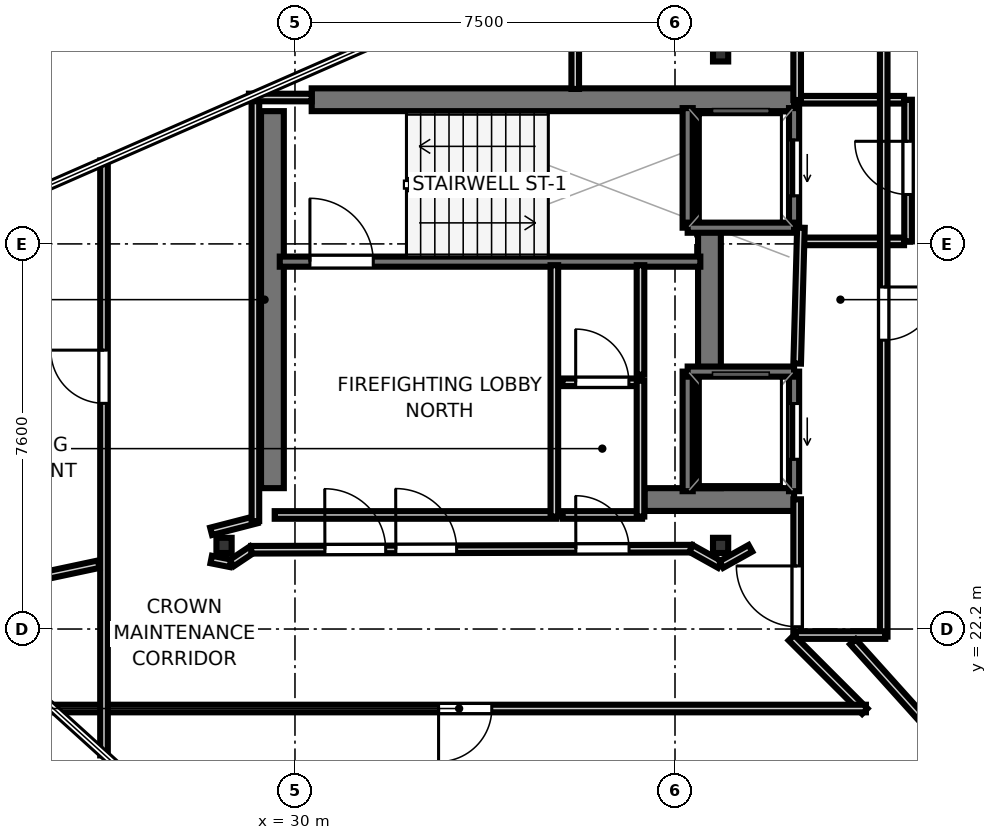
"""IFC4 building model, lengths in metres.
Left out: names, types, materials, properties, quantities, classifications, styles, units other than length and angle.
Written with IfcOpenShell. Run it as: python <this file> out.ifc"""

import sys

from ifc_helpers import new_model, si_unit, direction, frame, frame_2d, origin, origin_2d, place, context, subcontext, project, spatial, rectangle, i_section, extrude, element, fill, save


model = new_model("IFC4")
c1 = context("Model", 3, precision=1e-05, world=origin(), true_north=direction((0.0, 1.0)))
c2 = subcontext(c1, "Body", "Model", "MODEL_VIEW")
j1 = project(units=[si_unit("LENGTHUNIT", "METRE"), si_unit("PLANEANGLEUNIT", "RADIAN")], contexts=[c1])
p1 = place(None, origin())
s1 = spatial("IfcSite", under=j1, at=p1, CompositionType="ELEMENT")
p2 = place(p1, origin())
s2 = spatial("IfcBuilding", under=s1, at=p2, CompositionType="ELEMENT")
p3 = place(p2, frame((0.0, 0.0, 367.55)))
s3 = spatial("IfcBuildingStorey", under=s2, at=p3, CompositionType="ELEMENT", Elevation=367.55)
p4 = place(p3, frame((30.33, 32.645, 0.0), z_axis=(0.0, 0.0, 1.0), x_axis=(1.0, 0.0, 0.0)))
e1 = element("IfcWall", 1, at=p4, inside=s3, PredefinedType="SHEAR", context=c2, shape_type="SweptSolid", body=[
    extrude(rectangle(XDim=9.52, YDim=0.45, at=frame_2d((4.76, 0.0))), origin(), (0.0, 0.0, 1.0), 3.55),
])
p5 = place(p3, frame((36.9, 24.755, 0.0), z_axis=(0.0, 0.0, 1.0), x_axis=(1.0, 0.0, 0.0)))
e2 = element("IfcWall", 2, at=p5, inside=s3, PredefinedType="SHEAR", context=c2, shape_type="SweptSolid", body=[
    extrude(rectangle(XDim=2.95, YDim=0.45, at=frame_2d((1.475, 0.0))), origin(), (0.0, 0.0, 1.0), 3.55),
])
for number, where, z_axis, x_axis in (
    (3, (29.555, 24.98, 0.0), (0.0, 0.0, 1.0), (0.0, 1.0, 0.0)),
    (4, (38.18, 24.98, 0.0), (0.0, 0.0, 1.0), (0.0, 1.0, 0.0)),
):
    element("IfcWall", number, at=place(p3, frame(where, z_axis=z_axis, x_axis=x_axis)), inside=s3, PredefinedType="SHEAR", context=c2, shape_type="SweptSolid", body=[
        extrude(rectangle(XDim=7.44, YDim=0.45, at=frame_2d((3.72, 0.0))), origin(), (0.0, 0.0, 1.0), 3.55),
    ])
for number, where, z_axis, x_axis in (
    (5, (28.6, 23.85, 0.0), (0.0, 0.0, 1.0), (1.0, 0.0, 0.0)),
    (6, (38.4, 33.55, 0.0), (0.0, 0.0, 1.0), (1.0, 0.0, 0.0)),
    (7, (38.4, 23.85, 0.0), (0.0, 0.0, 1.0), (1.0, 0.0, 0.0)),
):
    element("IfcColumn", number, at=place(p3, frame(where, z_axis=z_axis, x_axis=x_axis)), inside=s3, PredefinedType="COLUMN", context=c2, shape_type="SweptSolid", body=[
        extrude(i_section(OverallWidth=0.3, OverallDepth=0.3, WebThickness=0.01, FlangeThickness=0.015, at=origin_2d()), origin(), (0.0, 0.0, 1.0), 3.75),
    ])
p6 = place(p3, frame((29.7, 29.45, 0.0), z_axis=(0.0, 0.0, 1.0), x_axis=(1.0, 0.0, 0.0)))
e8 = element("IfcWall", 8, at=p6, inside=s3, PredefinedType="SOLIDWALL", context=c2, shape_type="SweptSolid", body=[
    extrude(rectangle(XDim=8.3, YDim=0.2, at=frame_2d((4.15, 0.0))), origin(), (0.0, 0.0, 1.0), 3.55),
])
p7 = place(p6, frame((0.595, 0.0, 0.0)))
e9 = element("IfcOpeningElement", 9, at=p7, cuts=e8, PredefinedType="OPENING", context=c2, shape_type="SweptSolid", body=[
    extrude(rectangle(XDim=1.25, YDim=2.15, at=frame_2d((0.625, 1.075))), frame((0.0, 0.11, 0.0), z_axis=(0.0, -1.0, 0.0), x_axis=(1.0, 0.0, 0.0)), (0.0, 0.0, 1.0), 0.22),
])
p8 = place(p3, frame((39.85, 30.12, 0.0), z_axis=(0.0, 0.0, 1.0), x_axis=(0.0, 1.0, 0.0)))
e10 = element("IfcWall", 10, at=p8, inside=s3, PredefinedType="SOLIDWALL", context=c2, shape_type="SweptSolid", body=[
    extrude(rectangle(XDim=2.36, YDim=0.2, at=frame_2d((1.18, 0.0))), origin(), (0.0, 0.0, 1.0), 3.55),
])
p9 = place(p8, frame((0.63, 0.0, 0.0)))
e11 = element("IfcOpeningElement", 11, at=p9, cuts=e10, PredefinedType="OPENING", context=c2, shape_type="SweptSolid", body=[
    extrude(rectangle(XDim=1.1, YDim=2.15, at=frame_2d((0.55, 1.075))), frame((0.0, 0.11, 0.0), z_axis=(0.0, -1.0, 0.0), x_axis=(1.0, 0.0, 0.0)), (0.0, 0.0, 1.0), 0.22),
])
p10 = place(p3, frame((37.75, 30.12, 0.0), z_axis=(0.0, 0.0, 1.0), x_axis=(0.0, 1.0, 0.0)))
e12 = element("IfcWall", 12, at=p10, inside=s3, PredefinedType="SOLIDWALL", context=c2, shape_type="SweptSolid", body=[
    extrude(rectangle(XDim=2.36, YDim=0.2, at=frame_2d((1.18, 0.0))), origin(), (0.0, 0.0, 1.0), 3.55),
])
p11 = place(p3, frame((37.75, 30.12, 0.0), z_axis=(0.0, 0.0, 1.0), x_axis=(1.0, 0.0, 0.0)))
e13 = element("IfcWall", 13, at=p11, inside=s3, PredefinedType="SOLIDWALL", context=c2, shape_type="SweptSolid", body=[
    extrude(rectangle(XDim=2.1, YDim=0.2, at=frame_2d((1.05, 0.0))), origin(), (0.0, 0.0, 1.0), 3.55),
])
p12 = place(p3, frame((39.85, 24.92, 0.0), z_axis=(0.0, 0.0, 1.0), x_axis=(0.0, 1.0, 0.0)))
e14 = element("IfcWall", 14, at=p12, inside=s3, PredefinedType="SOLIDWALL", context=c2, shape_type="SweptSolid", body=[
    extrude(rectangle(XDim=2.36, YDim=0.2, at=frame_2d((1.18, 0.0))), origin(), (0.0, 0.0, 1.0), 3.55),
])
p13 = place(p12, frame((0.63, 0.0, 0.0)))
e15 = element("IfcOpeningElement", 15, at=p13, cuts=e14, PredefinedType="OPENING", context=c2, shape_type="SweptSolid", body=[
    extrude(rectangle(XDim=1.1, YDim=2.15, at=frame_2d((0.55, 1.075))), frame((0.0, 0.11, 0.0), z_axis=(0.0, -1.0, 0.0), x_axis=(1.0, 0.0, 0.0)), (0.0, 0.0, 1.0), 0.22),
])
p14 = place(p3, frame((37.75, 24.92, 0.0), z_axis=(0.0, 0.0, 1.0), x_axis=(0.0, 1.0, 0.0)))
e16 = element("IfcWall", 16, at=p14, inside=s3, PredefinedType="SOLIDWALL", context=c2, shape_type="SweptSolid", body=[
    extrude(rectangle(XDim=2.36, YDim=0.2, at=frame_2d((1.18, 0.0))), origin(), (0.0, 0.0, 1.0), 3.55),
])
p15 = place(p3, frame((37.75, 27.28, 0.0), z_axis=(0.0, 0.0, 1.0), x_axis=(1.0, 0.0, 0.0)))
e17 = element("IfcWall", 17, at=p15, inside=s3, PredefinedType="SOLIDWALL", context=c2, shape_type="SweptSolid", body=[
    extrude(rectangle(XDim=2.1, YDim=0.2, at=frame_2d((1.05, 0.0))), origin(), (0.0, 0.0, 1.0), 3.55),
])
p16 = place(p3, frame((42.1, 29.85, 0.0), z_axis=(0.0, 0.0, 1.0), x_axis=(0.0, 1.0, 0.0)))
e18 = element("IfcWall", 18, at=p16, inside=s3, PredefinedType="PARTITIONING", context=c2, shape_type="SweptSolid", body=[
    extrude(rectangle(XDim=2.795, YDim=0.15, at=frame_2d((1.397, 0.0))), origin(), (0.0, 0.0, 1.0), 2.87),
])
p17 = place(p16, frame((0.925, 0.0, 0.0)))
e19 = element("IfcOpeningElement", 19, at=p17, cuts=e18, PredefinedType="OPENING", context=c2, shape_type="SweptSolid", body=[
    extrude(rectangle(XDim=1.05, YDim=2.15, at=frame_2d((0.525, 1.075))), frame((0.0, 0.085, 0.0), z_axis=(0.0, -1.0, 0.0), x_axis=(1.0, 0.0, 0.0)), (0.0, 0.0, 1.0), 0.17),
])
for number, where, z_axis, x_axis in (
    (20, (39.96, 29.85, 0.0), (0.0, 0.0, 1.0), (1.0, 0.0, 0.0)),
    (21, (39.96, 32.645, 0.0), (0.0, 0.0, 1.0), (1.0, 0.0, 0.0)),
):
    element("IfcWall", number, at=place(p3, frame(where, z_axis=z_axis, x_axis=x_axis)), inside=s3, PredefinedType="PARTITIONING", context=c2, shape_type="SweptSolid", body=[
        extrude(rectangle(XDim=2.06, YDim=0.15, at=frame_2d((1.03, 0.0))), origin(), (0.0, 0.0, 1.0), 2.87),
    ])
p18 = place(p3, frame((35.15, 24.451, 0.0), z_axis=(0.0, 0.0, 1.0), x_axis=(-1.0, 0.0, 0.0)))
e22 = element("IfcWall", 22, at=p18, inside=s3, PredefinedType="PARTITIONING", context=c2, shape_type="SweptSolid", body=[
    extrude(rectangle(XDim=5.55, YDim=0.15, at=frame_2d((2.775, 0.0))), origin(), (0.0, 0.0, 1.0), 2.87),
])
p19 = place(p3, frame((35.119, 29.38, 0.0), z_axis=(0.0, 0.0, 1.0), x_axis=(0.0, -1.0, 0.0)))
e23 = element("IfcWall", 23, at=p19, inside=s3, PredefinedType="PARTITIONING", context=c2, shape_type="SweptSolid", body=[
    extrude(rectangle(XDim=4.96, YDim=0.15, at=frame_2d((2.48, 0.0))), origin(), (0.0, 0.0, 1.0), 2.08),
])
p20 = place(p3, frame((39.911, 22.05, 0.0), z_axis=(0.0, 0.0, 1.0), x_axis=(0.0, 1.0, 0.0)))
e24 = element("IfcWall", 24, at=p20, inside=s3, PredefinedType="PARTITIONING", context=c2, shape_type="SweptSolid", body=[
    extrude(rectangle(XDim=2.71, YDim=0.15, at=frame_2d((1.355, 0.0))), origin(), (0.0, 0.0, 1.0), 2.87),
])
p21 = place(p20, frame((0.195, 0.0, 0.0)))
e25 = element("IfcOpeningElement", 25, at=p21, cuts=e24, PredefinedType="OPENING", context=c2, shape_type="SweptSolid", body=[
    extrude(rectangle(XDim=1.2, YDim=2.15, at=frame_2d((0.6, 1.075))), frame((0.0, 0.085, 0.0), z_axis=(0.0, -1.0, 0.0), x_axis=(1.0, 0.0, 0.0)), (0.0, 0.0, 1.0), 0.17),
])
p22 = place(p3, frame((39.911, 27.439, 0.0), z_axis=(0.0, 0.0, 1.0), x_axis=(0.027673579092, 0.999617013171, 0.0)))
e26 = element("IfcWall", 26, at=p22, inside=s3, PredefinedType="PARTITIONING", context=c2, shape_type="SweptSolid", body=[
    extrude(rectangle(XDim=2.682, YDim=0.15, at=frame_2d((1.341, 0.0))), origin(), (0.0, 0.0, 1.0), 2.87),
])
p23 = place(p3, frame((39.911, 32.64, 0.0), z_axis=(0.0, 0.0, 1.0), x_axis=(0.0, 1.0, 0.0)))
e27 = element("IfcWall", 27, at=p23, inside=s3, PredefinedType="PARTITIONING", context=c2, shape_type="SweptSolid", body=[
    extrude(rectangle(XDim=2.16, YDim=0.15, at=frame_2d((1.08, 0.0))), origin(), (0.0, 0.0, 1.0), 2.87),
])
p24 = place(p3, frame((41.619, 34.8, 0.0), z_axis=(0.0, 0.0, 1.0), x_axis=(0.0, -1.0, 0.0)))
e28 = element("IfcWall", 28, at=p24, inside=s3, PredefinedType="PARTITIONING", context=c2, shape_type="SweptSolid", body=[
    extrude(rectangle(XDim=12.75, YDim=0.15, at=frame_2d((6.375, 0.0))), origin(), (0.0, 0.0, 1.0), 2.87),
])
p25 = place(p24, frame((5.85, 0.0, 0.0)))
e29 = element("IfcOpeningElement", 29, at=p25, cuts=e28, PredefinedType="OPENING", context=c2, shape_type="SweptSolid", body=[
    extrude(rectangle(XDim=1.05, YDim=2.15, at=frame_2d((0.525, 1.075))), frame((0.0, 0.085, 0.0), z_axis=(0.0, -1.0, 0.0), x_axis=(1.0, 0.0, 0.0)), (0.0, 0.0, 1.0), 0.17),
])
p26 = place(p3, frame((41.65, 22.081, 0.0), z_axis=(0.0, 0.0, 1.0), x_axis=(-1.0, 0.0, 0.0)))
e30 = element("IfcWall", 30, at=p26, inside=s3, PredefinedType="PARTITIONING", context=c2, shape_type="SweptSolid", body=[
    extrude(rectangle(XDim=1.77, YDim=0.15, at=frame_2d((0.885, 0.0))), origin(), (0.0, 0.0, 1.0), 2.87),
])
p27 = place(p3, frame((36.85, 24.451, 0.0), z_axis=(0.0, 0.0, 1.0), x_axis=(-1.0, 0.0, 0.0)))
e31 = element("IfcWall", 31, at=p27, inside=s3, PredefinedType="PARTITIONING", context=c2, shape_type="SweptSolid", body=[
    extrude(rectangle(XDim=1.57, YDim=0.15, at=frame_2d((0.785, 0.0))), origin(), (0.0, 0.0, 1.0), 2.87),
])
p28 = place(p3, frame((35.28, 27.069, 0.0), z_axis=(0.0, 0.0, 1.0), x_axis=(1.0, 0.0, 0.0)))
e32 = element("IfcWall", 32, at=p28, inside=s3, PredefinedType="PARTITIONING", context=c2, shape_type="SweptSolid", body=[
    extrude(rectangle(XDim=1.57, YDim=0.15, at=frame_2d((0.785, 0.0))), origin(), (0.0, 0.0, 1.0), 2.87),
])
p29 = place(p28, frame((0.26, 0.0, 0.0)))
e33 = element("IfcOpeningElement", 33, at=p29, cuts=e32, PredefinedType="OPENING", context=c2, shape_type="SweptSolid", body=[
    extrude(rectangle(XDim=1.05, YDim=2.15, at=frame_2d((0.525, 1.075))), frame((0.0, 0.085, 0.0), z_axis=(0.0, -1.0, 0.0), x_axis=(1.0, 0.0, 0.0)), (0.0, 0.0, 1.0), 0.17),
])
p30 = place(p3, frame((36.819, 27.1, 0.0), z_axis=(0.0, 0.0, 1.0), x_axis=(0.0, -1.0, 0.0)))
e34 = element("IfcWall", 34, at=p30, inside=s3, PredefinedType="PARTITIONING", context=c2, shape_type="SweptSolid", body=[
    extrude(rectangle(XDim=2.68, YDim=0.15, at=frame_2d((1.34, 0.0))), origin(), (0.0, 0.0, 1.0), 2.87),
])
p31 = place(p3, frame((36.819, 29.38, 0.0), z_axis=(0.0, 0.0, 1.0), x_axis=(0.0, -1.0, 0.0)))
e35 = element("IfcWall", 35, at=p31, inside=s3, PredefinedType="PARTITIONING", context=c2, shape_type="SweptSolid", body=[
    extrude(rectangle(XDim=2.16, YDim=0.15, at=frame_2d((1.08, 0.0))), origin(), (0.0, 0.0, 1.0), 2.87),
])
p32 = place(p3, frame((35.531, 32.858, 0.0), z_axis=(0.0, 0.0, 1.0), x_axis=(0.0, 1.0, 0.0)))
e36 = element("IfcWall", 36, at=p32, inside=s3, PredefinedType="PARTITIONING", context=c2, shape_type="SweptSolid", body=[
    extrude(rectangle(XDim=2.666, YDim=0.15, at=frame_2d((1.333, 0.0))), origin(), (0.0, 0.0, 1.0), 2.87),
])
p33 = place(p3, frame((29.242, 24.359, 0.0), z_axis=(0.0, 0.0, 1.0), x_axis=(-0.968190928123, -0.250212563035, 0.0)))
e37 = element("IfcWall", 37, at=p33, inside=s3, PredefinedType="PARTITIONING", context=c2, shape_type="SweptSolid", body=[
    extrude(rectangle(XDim=0.927, YDim=0.15, at=frame_2d((0.463, 0.0))), origin(), (0.0, 0.0, 1.0), 2.87),
])
p34 = place(p3, frame((28.346, 23.572, 0.0), z_axis=(0.0, 0.0, 1.0), x_axis=(0.980749356168, -0.19527083852, 0.0)))
e38 = element("IfcWall", 38, at=p34, inside=s3, PredefinedType="PARTITIONING", context=c2, shape_type="SweptSolid", body=[
    extrude(rectangle(XDim=0.389, YDim=0.15, at=frame_2d((0.194, 0.0))), origin(), (0.0, 0.0, 1.0), 2.87),
])
p35 = place(p3, frame((28.751, 23.501, 0.0), z_axis=(0.0, 0.0, 1.0), x_axis=(0.831506528289, 0.555514980368, 0.0)))
e39 = element("IfcWall", 39, at=p35, inside=s3, PredefinedType="PARTITIONING", context=c2, shape_type="SweptSolid", body=[
    extrude(rectangle(XDim=0.484, YDim=0.15, at=frame_2d((0.242, 0.0))), origin(), (0.0, 0.0, 1.0), 2.87),
])
p36 = place(p3, frame((29.136, 23.764, 0.0), z_axis=(0.0, 0.0, 1.0), x_axis=(0.999996877471, 0.002499009437, 0.0)))
e40 = element("IfcWall", 40, at=p36, inside=s3, PredefinedType="PARTITIONING", context=c2, shape_type="SweptSolid", body=[
    extrude(rectangle(XDim=8.695, YDim=0.15, at=frame_2d((4.347, 0.0))), origin(), (0.0, 0.0, 1.0), 2.87),
])
p37 = place(p36, frame((2.854, 0.0, 0.0)))
e41 = element("IfcOpeningElement", 41, at=p37, cuts=e40, PredefinedType="OPENING", context=c2, shape_type="SweptSolid", body=[
    extrude(rectangle(XDim=1.2, YDim=2.15, at=frame_2d((0.6, 1.075))), frame((0.0, 0.085, 0.0), z_axis=(0.0, -1.0, 0.0), x_axis=(1.0, 0.0, 0.0)), (0.0, 0.0, 1.0), 0.17),
])
p38 = place(p36, frame((6.407, 0.0, 0.0)))
e42 = element("IfcOpeningElement", 42, at=p38, cuts=e40, PredefinedType="OPENING", context=c2, shape_type="SweptSolid", body=[
    extrude(rectangle(XDim=1.05, YDim=2.15, at=frame_2d((0.525, 1.075))), frame((0.0, 0.085, 0.0), z_axis=(0.0, -1.0, 0.0), x_axis=(1.0, 0.0, 0.0)), (0.0, 0.0, 1.0), 0.17),
])
p39 = place(p36, frame((1.454, 0.0, 0.0)))
e43 = element("IfcOpeningElement", 43, at=p39, cuts=e40, PredefinedType="OPENING", context=c2, shape_type="SweptSolid", body=[
    extrude(rectangle(XDim=1.2, YDim=2.15, at=frame_2d((0.6, 1.075))), frame((0.0, 0.085, 0.0), z_axis=(0.0, -1.0, 0.0), x_axis=(1.0, 0.0, 0.0)), (0.0, 0.0, 1.0), 0.17),
])
p40 = place(p3, frame((37.816, 23.79, 0.0), z_axis=(0.0, 0.0, 1.0), x_axis=(0.873431330758, -0.486947338478, 0.0)))
e44 = element("IfcWall", 44, at=p40, inside=s3, PredefinedType="PARTITIONING", context=c2, shape_type="SweptSolid", body=[
    extrude(rectangle(XDim=0.651, YDim=0.15, at=frame_2d((0.326, 0.0))), origin(), (0.0, 0.0, 1.0), 2.87),
])
p41 = place(p3, frame((38.415, 23.473, 0.0), z_axis=(0.0, 0.0, 1.0), x_axis=(0.873120406102, 0.487504621976, 0.0)))
e45 = element("IfcWall", 45, at=p41, inside=s3, PredefinedType="PARTITIONING", context=c2, shape_type="SweptSolid", body=[
    extrude(rectangle(XDim=0.656, YDim=0.15, at=frame_2d((0.328, 0.0))), origin(), (0.0, 0.0, 1.0), 2.87),
])
p42 = place(p3, frame((39.796, 22.028, 0.0), z_axis=(0.0, 0.0, 1.0), x_axis=(0.707106781187, -0.707106781187, 0.0)))
e46 = element("IfcWall", 46, at=p42, inside=s3, PredefinedType="PARTITIONING", context=c2, shape_type="SweptSolid", body=[
    extrude(rectangle(XDim=2.051, YDim=0.15, at=frame_2d((1.025, 0.0))), origin(), (0.0, 0.0, 1.0), 2.87),
])
p43 = place(p3, frame((41.268, 20.631, 0.0), z_axis=(0.0, 0.0, 1.0), x_axis=(-1.0, 0.0, 0.0)))
e47 = element("IfcWall", 47, at=p43, inside=s3, PredefinedType="PARTITIONING", context=c2, shape_type="SweptSolid", body=[
    extrude(rectangle(XDim=16.057, YDim=0.15, at=frame_2d((8.028, 0.0))), origin(), (0.0, 0.0, 1.0), 2.87),
])
p44 = place(p43, frame((7.384, 0.0, 0.0)))
e48 = element("IfcOpeningElement", 48, at=p44, cuts=e47, PredefinedType="OPENING", context=c2, shape_type="SweptSolid", body=[
    extrude(rectangle(XDim=1.05, YDim=2.15, at=frame_2d((0.525, 1.075))), frame((0.0, 0.085, 0.0), z_axis=(0.0, -1.0, 0.0), x_axis=(1.0, 0.0, 0.0)), (0.0, 0.0, 1.0), 0.17),
])
p45 = place(p3, frame((26.231, 19.706, 0.0), z_axis=(0.0, 0.0, 1.0), x_axis=(0.0, 1.0, 0.0)))
e49 = element("IfcWall", 49, at=p45, inside=s3, PredefinedType="PARTITIONING", context=c2, shape_type="SweptSolid", body=[
    extrude(rectangle(XDim=11.742, YDim=0.15, at=frame_2d((5.871, 0.0))), origin(), (0.0, 0.0, 1.0), 2.87),
])
p46 = place(p45, frame((6.948, 0.0, 0.0)))
e50 = element("IfcOpeningElement", 50, at=p46, cuts=e49, PredefinedType="OPENING", context=c2, shape_type="SweptSolid", body=[
    extrude(rectangle(XDim=1.05, YDim=2.15, at=frame_2d((0.525, 1.075))), frame((0.0, 0.085, 0.0), z_axis=(0.0, -1.0, 0.0), x_axis=(1.0, 0.0, 0.0)), (0.0, 0.0, 1.0), 0.17),
])
p47 = place(p3, frame((29.219, 32.757, 0.0), z_axis=(0.0, 0.0, 1.0), x_axis=(0.0, -1.0, 0.0)))
e51 = element("IfcWall", 51, at=p47, inside=s3, PredefinedType="PARTITIONING", context=c2, shape_type="SweptSolid", body=[
    extrude(rectangle(XDim=8.428, YDim=0.15, at=frame_2d((4.214, 0.0))), origin(), (0.0, 0.0, 1.0), 2.87),
])
p48 = place(p3, frame((22.834, 22.78, 0.0), z_axis=(0.0, 0.0, 1.0), x_axis=(0.978152398194, 0.20788911926, 0.0)))
e52 = element("IfcWall", 52, at=p48, inside=s3, PredefinedType="PARTITIONING", context=c2, shape_type="SweptSolid", body=[
    extrude(rectangle(XDim=3.366, YDim=0.15, at=frame_2d((1.683, 0.0))), origin(), (0.0, 0.0, 1.0), 2.87),
])
p49 = place(p3, frame((41.011, 21.949, 0.0), z_axis=(0.0, 0.0, 1.0), x_axis=(0.669147587513, -0.743129535226, 0.0)))
e53 = element("IfcWall", 53, at=p49, inside=s3, PredefinedType="PARTITIONING", context=c2, shape_type="SweptSolid", body=[
    extrude(rectangle(XDim=5.679, YDim=0.15, at=frame_2d((2.84, 0.0))), origin(), (0.0, 0.0, 1.0), 2.87),
])
p50 = place(p3, frame((30.33, 32.688, 0.0), z_axis=(0.0, 0.0, 1.0), x_axis=(-0.999998426292, 0.001774095375, 0.0)))
e54 = element("IfcWall", 54, at=p50, inside=s3, PredefinedType="PARTITIONING", context=c2, shape_type="SweptSolid", body=[
    extrude(rectangle(XDim=1.239, YDim=0.15, at=frame_2d((0.619, 0.0))), origin(), (0.0, 0.0, 1.0), 2.87),
])
p51 = place(p7, origin())
e55 = element("IfcDoor", 55, at=p51, inside=s3, OperationType="SINGLE_SWING_LEFT", PredefinedType="DOOR", context=c2, shape_type="SweptSolid", body=[
    extrude(rectangle(XDim=1.25, YDim=2.15, at=frame_2d((0.625, 1.075))), frame((0.0, 0.025, 0.0), z_axis=(0.0, -1.0, 0.0), x_axis=(1.0, 0.0, 0.0)), (0.0, 0.0, 1.0), 0.05),
])
fill(e9, e55)
p52 = place(p9, origin())
e56 = element("IfcDoor", 56, at=p52, inside=s3, OperationType="SLIDING_TO_LEFT", PredefinedType="DOOR", context=c2, shape_type="SweptSolid", body=[
    extrude(rectangle(XDim=1.1, YDim=2.15, at=frame_2d((0.55, 1.075))), frame((0.0, 0.025, 0.0), z_axis=(0.0, -1.0, 0.0), x_axis=(1.0, 0.0, 0.0)), (0.0, 0.0, 1.0), 0.05),
])
fill(e11, e56)
p53 = place(p13, origin())
e57 = element("IfcDoor", 57, at=p53, inside=s3, OperationType="SLIDING_TO_LEFT", PredefinedType="DOOR", context=c2, shape_type="SweptSolid", body=[
    extrude(rectangle(XDim=1.1, YDim=2.15, at=frame_2d((0.55, 1.075))), frame((0.0, 0.025, 0.0), z_axis=(0.0, -1.0, 0.0), x_axis=(1.0, 0.0, 0.0)), (0.0, 0.0, 1.0), 0.05),
])
fill(e15, e57)
p54 = place(p17, origin())
e58 = element("IfcDoor", 58, at=p54, inside=s3, OperationType="SINGLE_SWING_RIGHT", PredefinedType="DOOR", context=c2, shape_type="SweptSolid", body=[
    extrude(rectangle(XDim=1.05, YDim=2.15, at=frame_2d((0.525, 1.075))), frame((0.0, 0.025, 0.0), z_axis=(0.0, -1.0, 0.0), x_axis=(1.0, 0.0, 0.0)), (0.0, 0.0, 1.0), 0.05),
])
fill(e19, e58)
p55 = place(p37, origin())
e59 = element("IfcDoor", 59, at=p55, inside=s3, OperationType="SINGLE_SWING_LEFT", PredefinedType="DOOR", context=c2, shape_type="SweptSolid", body=[
    extrude(rectangle(XDim=1.2, YDim=2.15, at=frame_2d((0.6, 1.075))), frame((0.0, 0.025, 0.0), z_axis=(0.0, -1.0, 0.0), x_axis=(1.0, 0.0, 0.0)), (0.0, 0.0, 1.0), 0.05),
])
fill(e41, e59)
p56 = place(p21, origin())
e60 = element("IfcDoor", 60, at=p56, inside=s3, OperationType="SINGLE_SWING_RIGHT", PredefinedType="DOOR", context=c2, shape_type="SweptSolid", body=[
    extrude(rectangle(XDim=1.2, YDim=2.15, at=frame_2d((0.6, 1.075))), frame((0.0, 0.025, 0.0), z_axis=(0.0, -1.0, 0.0), x_axis=(1.0, 0.0, 0.0)), (0.0, 0.0, 1.0), 0.05),
])
fill(e25, e60)
p57 = place(p38, origin())
e61 = element("IfcDoor", 61, at=p57, inside=s3, OperationType="SINGLE_SWING_LEFT", PredefinedType="DOOR", context=c2, shape_type="SweptSolid", body=[
    extrude(rectangle(XDim=1.05, YDim=2.15, at=frame_2d((0.525, 1.075))), frame((0.0, 0.025, 0.0), z_axis=(0.0, -1.0, 0.0), x_axis=(1.0, 0.0, 0.0)), (0.0, 0.0, 1.0), 0.05),
])
fill(e42, e61)
p58 = place(p29, origin())
e62 = element("IfcDoor", 62, at=p58, inside=s3, OperationType="SINGLE_SWING_LEFT", PredefinedType="DOOR", context=c2, shape_type="SweptSolid", body=[
    extrude(rectangle(XDim=1.05, YDim=2.15, at=frame_2d((0.525, 1.075))), frame((0.0, 0.025, 0.0), z_axis=(0.0, -1.0, 0.0), x_axis=(1.0, 0.0, 0.0)), (0.0, 0.0, 1.0), 0.05),
])
fill(e33, e62)
p59 = place(p39, origin())
e63 = element("IfcDoor", 63, at=p59, inside=s3, OperationType="SINGLE_SWING_LEFT", PredefinedType="DOOR", context=c2, shape_type="SweptSolid", body=[
    extrude(rectangle(XDim=1.2, YDim=2.15, at=frame_2d((0.6, 1.075))), frame((0.0, 0.025, 0.0), z_axis=(0.0, -1.0, 0.0), x_axis=(1.0, 0.0, 0.0)), (0.0, 0.0, 1.0), 0.05),
])
fill(e43, e63)
p60 = place(p44, origin())
e64 = element("IfcDoor", 64, at=p60, inside=s3, OperationType="SINGLE_SWING_RIGHT", PredefinedType="DOOR", context=c2, shape_type="SweptSolid", body=[
    extrude(rectangle(XDim=1.05, YDim=2.15, at=frame_2d((0.525, 1.075))), frame((0.0, 0.025, 0.0), z_axis=(0.0, -1.0, 0.0), x_axis=(1.0, 0.0, 0.0)), (0.0, 0.0, 1.0), 0.05),
])
fill(e48, e64)
p61 = place(p25, origin())
e65 = element("IfcDoor", 65, at=p61, inside=s3, OperationType="SINGLE_SWING_LEFT", PredefinedType="DOOR", context=c2, shape_type="SweptSolid", body=[
    extrude(rectangle(XDim=1.05, YDim=2.15, at=frame_2d((0.525, 1.075))), frame((0.0, 0.025, 0.0), z_axis=(0.0, -1.0, 0.0), x_axis=(1.0, 0.0, 0.0)), (0.0, 0.0, 1.0), 0.05),
])
fill(e29, e65)
p62 = place(p46, origin())
e66 = element("IfcDoor", 66, at=p62, inside=s3, OperationType="SINGLE_SWING_RIGHT", PredefinedType="DOOR", context=c2, shape_type="SweptSolid", body=[
    extrude(rectangle(XDim=1.05, YDim=2.15, at=frame_2d((0.525, 1.075))), frame((0.0, 0.025, 0.0), z_axis=(0.0, -1.0, 0.0), x_axis=(1.0, 0.0, 0.0)), (0.0, 0.0, 1.0), 0.05),
])
fill(e50, e66)
save(model, sys.argv[1])
